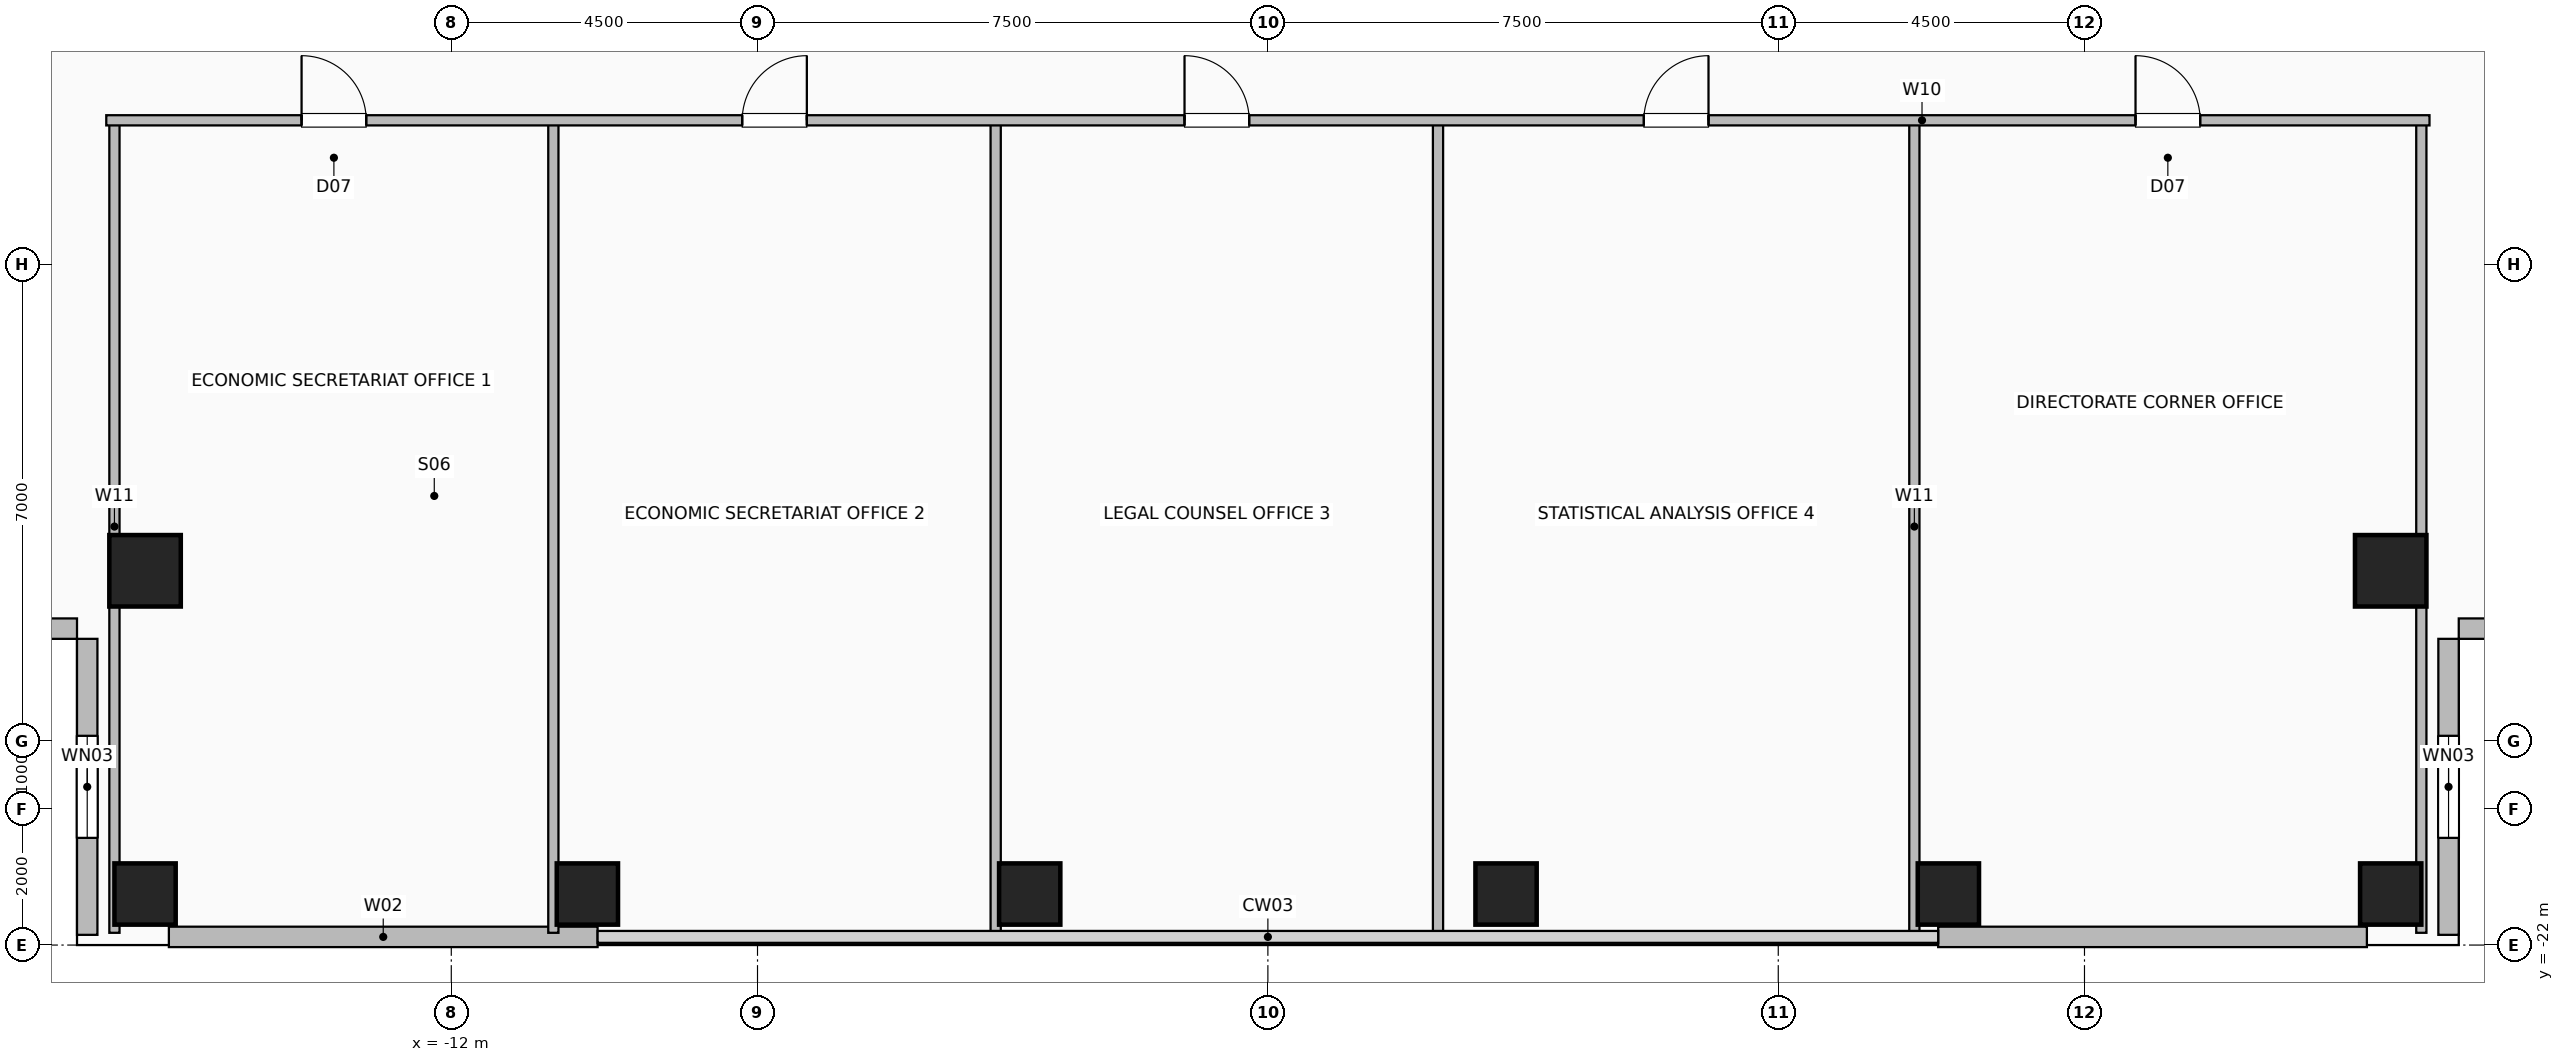
"""IFC4 building model, lengths in metres.
Left out: names, types, materials, properties, quantities, classifications, styles, units other than length and angle.
Written with IfcOpenShell. Run it as: python <this file> out.ifc"""

import sys

from ifc_helpers import new_model, si_unit, direction, frame, frame_2d, origin, origin_2d, place, context, subcontext, project, spatial, rectangle, hollow_rectangle, extrude, element, fill, save


model = new_model("IFC4")
c1 = context("Model", 3, precision=1e-05, world=origin(), true_north=direction((0.0, 1.0)))
c2 = subcontext(c1, "Body", "Model", "MODEL_VIEW")
j1 = project(units=[si_unit("LENGTHUNIT", "METRE"), si_unit("PLANEANGLEUNIT", "RADIAN")], contexts=[c1])
p1 = place(None, origin())
s1 = spatial("IfcSite", under=j1, at=p1, CompositionType="ELEMENT")
p2 = place(p1, origin())
s2 = spatial("IfcBuilding", under=s1, at=p2, CompositionType="ELEMENT")
p3 = place(p2, frame((0.0, 0.0, 112.0)))
s3 = spatial("IfcBuildingStorey", under=s2, at=p3, CompositionType="ELEMENT", Elevation=112.0)
for number, where, z_axis, x_axis in (
    (1, (-16.5, -21.25, 0.0), (0.0, 0.0, 1.0), (1.0, 0.0, 0.0)),
    (2, (-10.0, -21.25, 0.0), (0.0, 0.0, 1.0), (1.0, 0.0, 0.0)),
    (3, (-3.5, -21.25, 0.0), (0.0, 0.0, 1.0), (1.0, 0.0, 0.0)),
    (4, (3.5, -21.25, 0.0), (0.0, 0.0, 1.0), (1.0, 0.0, 0.0)),
    (5, (10.0, -21.25, 0.0), (0.0, 0.0, 1.0), (1.0, 0.0, 0.0)),
    (6, (16.5, -21.25, 0.0), (0.0, 0.0, 1.0), (1.0, 0.0, 0.0)),
):
    element("IfcColumn", number, at=place(p3, frame(where, z_axis=z_axis, x_axis=x_axis)), inside=s3, PredefinedType="COLUMN", context=c2, shape_type="SweptSolid", body=[
        extrude(hollow_rectangle(XDim=0.9, YDim=0.9, WallThickness=0.045, at=origin_2d()), origin(), (0.0, 0.0, 1.0), 3.6),
    ])
for number, where, z_axis, x_axis in (
    (7, (-16.5, -16.5, 0.0), (0.0, 0.0, 1.0), (1.0, 0.0, 0.0)),
    (8, (16.5, -16.5, 0.0), (0.0, 0.0, 1.0), (1.0, 0.0, 0.0)),
):
    element("IfcColumn", number, at=place(p3, frame(where, z_axis=z_axis, x_axis=x_axis)), inside=s3, PredefinedType="COLUMN", context=c2, shape_type="SweptSolid", body=[
        extrude(hollow_rectangle(XDim=1.05, YDim=1.05, WallThickness=0.05, at=origin_2d()), origin(), (0.0, 0.0, 1.0), 3.6),
    ])
for number, where, z_axis, x_axis in (
    (9, (-16.15, -21.88, 0.0), (0.0, 0.0, 1.0), (1.0, 0.0, 0.0)),
    (10, (9.85, -21.88, 0.0), (0.0, 0.0, 1.0), (1.0, 0.0, 0.0)),
):
    element("IfcWall", number, at=place(p3, frame(where, z_axis=z_axis, x_axis=x_axis)), inside=s3, PredefinedType="SOLIDWALL", context=c2, shape_type="SweptSolid", body=[
        extrude(rectangle(XDim=6.3, YDim=0.3, at=frame_2d((3.15, 0.0))), origin(), (0.0, 0.0, 1.0), 3.36),
    ])
p4 = place(p3, frame((-17.35, -21.85, 0.0), z_axis=(0.0, 0.0, 1.0), x_axis=(0.0, 1.0, 0.0)))
e11 = element("IfcWall", 11, at=p4, inside=s3, PredefinedType="SOLIDWALL", context=c2, shape_type="SweptSolid", body=[
    extrude(rectangle(XDim=4.35, YDim=0.3, at=frame_2d((2.175, 0.0))), origin(), (0.0, 0.0, 1.0), 3.36),
])
p5 = place(p4, frame((1.425, 0.0, 0.9)))
e12 = element("IfcOpeningElement", 12, at=p5, cuts=e11, PredefinedType="OPENING", context=c2, shape_type="SweptSolid", body=[
    extrude(rectangle(XDim=1.5, YDim=1.8, at=frame_2d((0.75, 0.9))), frame((0.0, 0.16, 0.0), z_axis=(0.0, -1.0, 0.0), x_axis=(1.0, 0.0, 0.0)), (0.0, 0.0, 1.0), 0.32),
])
p6 = place(p3, frame((-21.85, -17.35, 0.0), z_axis=(0.0, 0.0, 1.0), x_axis=(1.0, 0.0, 0.0)))
e13 = element("IfcWall", 13, at=p6, inside=s3, PredefinedType="SOLIDWALL", context=c2, shape_type="SweptSolid", body=[
    extrude(rectangle(XDim=4.35, YDim=0.3, at=frame_2d((2.175, 0.0))), origin(), (0.0, 0.0, 1.0), 3.36),
])
p7 = place(p3, frame((17.35, -21.85, 0.0), z_axis=(0.0, 0.0, 1.0), x_axis=(0.0, 1.0, 0.0)))
e14 = element("IfcWall", 14, at=p7, inside=s3, PredefinedType="SOLIDWALL", context=c2, shape_type="SweptSolid", body=[
    extrude(rectangle(XDim=4.35, YDim=0.3, at=frame_2d((2.175, 0.0))), origin(), (0.0, 0.0, 1.0), 3.36),
])
p8 = place(p7, frame((1.425, 0.0, 0.9)))
e15 = element("IfcOpeningElement", 15, at=p8, cuts=e14, PredefinedType="OPENING", context=c2, shape_type="SweptSolid", body=[
    extrude(rectangle(XDim=1.5, YDim=1.8, at=frame_2d((0.75, 0.9))), frame((0.0, 0.16, 0.0), z_axis=(0.0, -1.0, 0.0), x_axis=(1.0, 0.0, 0.0)), (0.0, 0.0, 1.0), 0.32),
])
p9 = place(p3, frame((21.85, -17.35, 0.0), z_axis=(0.0, 0.0, 1.0), x_axis=(-1.0, 0.0, 0.0)))
e16 = element("IfcWall", 16, at=p9, inside=s3, PredefinedType="SOLIDWALL", context=c2, shape_type="SweptSolid", body=[
    extrude(rectangle(XDim=4.35, YDim=0.3, at=frame_2d((2.175, 0.0))), origin(), (0.0, 0.0, 1.0), 3.36),
])
for number, where, z_axis, x_axis in (
    (17, (-16.95, -21.82, 0.0), (0.0, 0.0, 1.0), (0.0, 1.0, 0.0)),
    (18, (-10.5, -21.82, 0.0), (0.0, 0.0, 1.0), (0.0, 1.0, 0.0)),
    (19, (-4.0, -21.82, 0.0), (0.0, 0.0, 1.0), (0.0, 1.0, 0.0)),
    (20, (2.5, -21.82, 0.0), (0.0, 0.0, 1.0), (0.0, 1.0, 0.0)),
    (21, (9.5, -21.82, 0.0), (0.0, 0.0, 1.0), (0.0, 1.0, 0.0)),
    (22, (16.95, -21.82, 0.0), (0.0, 0.0, 1.0), (0.0, 1.0, 0.0)),
):
    element("IfcWall", number, at=place(p3, frame(where, z_axis=z_axis, x_axis=x_axis)), inside=s3, PredefinedType="PARTITIONING", context=c2, shape_type="SweptSolid", body=[
        extrude(rectangle(XDim=11.94, YDim=0.15, at=frame_2d((5.97, 0.0))), origin(), (0.0, 0.0, 1.0), 3.36),
    ])
p10 = place(p3, frame((-17.07, -9.88, 0.0), z_axis=(0.0, 0.0, 1.0), x_axis=(1.0, 0.0, 0.0)))
e23 = element("IfcWall", 23, at=p10, inside=s3, PredefinedType="PARTITIONING", context=c2, shape_type="SweptSolid", body=[
    extrude(rectangle(XDim=34.14, YDim=0.15, at=frame_2d((17.07, 0.0))), origin(), (0.0, 0.0, 1.0), 3.36),
])
p11 = place(p10, frame((2.87, 0.0, 0.0)))
e24 = element("IfcOpeningElement", 24, at=p11, cuts=e23, PredefinedType="OPENING", context=c2, shape_type="SweptSolid", body=[
    extrude(rectangle(XDim=0.95, YDim=2.06, at=frame_2d((0.475, 1.03))), frame((0.0, 0.085, 0.0), z_axis=(0.0, -1.0, 0.0), x_axis=(1.0, 0.0, 0.0)), (0.0, 0.0, 1.0), 0.17),
])
p12 = place(p10, frame((9.345, 0.0, 0.0)))
e25 = element("IfcOpeningElement", 25, at=p12, cuts=e23, PredefinedType="OPENING", context=c2, shape_type="SweptSolid", body=[
    extrude(rectangle(XDim=0.95, YDim=2.06, at=frame_2d((0.475, 1.03))), frame((0.0, 0.085, 0.0), z_axis=(0.0, -1.0, 0.0), x_axis=(1.0, 0.0, 0.0)), (0.0, 0.0, 1.0), 0.17),
])
p13 = place(p10, frame((15.845, 0.0, 0.0)))
e26 = element("IfcOpeningElement", 26, at=p13, cuts=e23, PredefinedType="OPENING", context=c2, shape_type="SweptSolid", body=[
    extrude(rectangle(XDim=0.95, YDim=2.06, at=frame_2d((0.475, 1.03))), frame((0.0, 0.085, 0.0), z_axis=(0.0, -1.0, 0.0), x_axis=(1.0, 0.0, 0.0)), (0.0, 0.0, 1.0), 0.17),
])
p14 = place(p10, frame((22.595, 0.0, 0.0)))
e27 = element("IfcOpeningElement", 27, at=p14, cuts=e23, PredefinedType="OPENING", context=c2, shape_type="SweptSolid", body=[
    extrude(rectangle(XDim=0.95, YDim=2.06, at=frame_2d((0.475, 1.03))), frame((0.0, 0.085, 0.0), z_axis=(0.0, -1.0, 0.0), x_axis=(1.0, 0.0, 0.0)), (0.0, 0.0, 1.0), 0.17),
])
p15 = place(p10, frame((29.82, 0.0, 0.0)))
e28 = element("IfcOpeningElement", 28, at=p15, cuts=e23, PredefinedType="OPENING", context=c2, shape_type="SweptSolid", body=[
    extrude(rectangle(XDim=0.95, YDim=2.06, at=frame_2d((0.475, 1.03))), frame((0.0, 0.085, 0.0), z_axis=(0.0, -1.0, 0.0), x_axis=(1.0, 0.0, 0.0)), (0.0, 0.0, 1.0), 0.17),
])
p16 = place(p5, origin())
e29 = element("IfcWindow", 29, at=p16, inside=s3, PartitioningType="SINGLE_PANEL", PredefinedType="WINDOW", context=c2, shape_type="SweptSolid", body=[
    extrude(rectangle(XDim=1.5, YDim=1.8, at=frame_2d((0.75, 0.9))), frame((0.0, 0.03, 0.0), z_axis=(0.0, -1.0, 0.0), x_axis=(1.0, 0.0, 0.0)), (0.0, 0.0, 1.0), 0.06),
])
fill(e12, e29)
p17 = place(p8, origin())
e30 = element("IfcWindow", 30, at=p17, inside=s3, PartitioningType="SINGLE_PANEL", PredefinedType="WINDOW", context=c2, shape_type="SweptSolid", body=[
    extrude(rectangle(XDim=1.5, YDim=1.8, at=frame_2d((0.75, 0.9))), frame((0.0, 0.03, 0.0), z_axis=(0.0, -1.0, 0.0), x_axis=(1.0, 0.0, 0.0)), (0.0, 0.0, 1.0), 0.06),
])
fill(e15, e30)
p18 = place(p11, origin())
e31 = element("IfcDoor", 31, at=p18, inside=s3, OperationType="SINGLE_SWING_LEFT", PredefinedType="DOOR", context=c2, shape_type="SweptSolid", body=[
    extrude(rectangle(XDim=0.95, YDim=2.06, at=frame_2d((0.475, 1.03))), frame((0.0, 0.025, 0.0), z_axis=(0.0, -1.0, 0.0), x_axis=(1.0, 0.0, 0.0)), (0.0, 0.0, 1.0), 0.05),
])
fill(e24, e31)
p19 = place(p12, origin())
e32 = element("IfcDoor", 32, at=p19, inside=s3, OperationType="SINGLE_SWING_RIGHT", PredefinedType="DOOR", context=c2, shape_type="SweptSolid", body=[
    extrude(rectangle(XDim=0.95, YDim=2.06, at=frame_2d((0.475, 1.03))), frame((0.0, 0.025, 0.0), z_axis=(0.0, -1.0, 0.0), x_axis=(1.0, 0.0, 0.0)), (0.0, 0.0, 1.0), 0.05),
])
fill(e25, e32)
p20 = place(p13, origin())
e33 = element("IfcDoor", 33, at=p20, inside=s3, OperationType="SINGLE_SWING_LEFT", PredefinedType="DOOR", context=c2, shape_type="SweptSolid", body=[
    extrude(rectangle(XDim=0.95, YDim=2.06, at=frame_2d((0.475, 1.03))), frame((0.0, 0.025, 0.0), z_axis=(0.0, -1.0, 0.0), x_axis=(1.0, 0.0, 0.0)), (0.0, 0.0, 1.0), 0.05),
])
fill(e26, e33)
p21 = place(p14, origin())
e34 = element("IfcDoor", 34, at=p21, inside=s3, OperationType="SINGLE_SWING_RIGHT", PredefinedType="DOOR", context=c2, shape_type="SweptSolid", body=[
    extrude(rectangle(XDim=0.95, YDim=2.06, at=frame_2d((0.475, 1.03))), frame((0.0, 0.025, 0.0), z_axis=(0.0, -1.0, 0.0), x_axis=(1.0, 0.0, 0.0)), (0.0, 0.0, 1.0), 0.05),
])
fill(e27, e34)
p22 = place(p15, origin())
e35 = element("IfcDoor", 35, at=p22, inside=s3, OperationType="SINGLE_SWING_LEFT", PredefinedType="DOOR", context=c2, shape_type="SweptSolid", body=[
    extrude(rectangle(XDim=0.95, YDim=2.06, at=frame_2d((0.475, 1.03))), frame((0.0, 0.025, 0.0), z_axis=(0.0, -1.0, 0.0), x_axis=(1.0, 0.0, 0.0)), (0.0, 0.0, 1.0), 0.05),
])
fill(e28, e35)
save(model, sys.argv[1])
